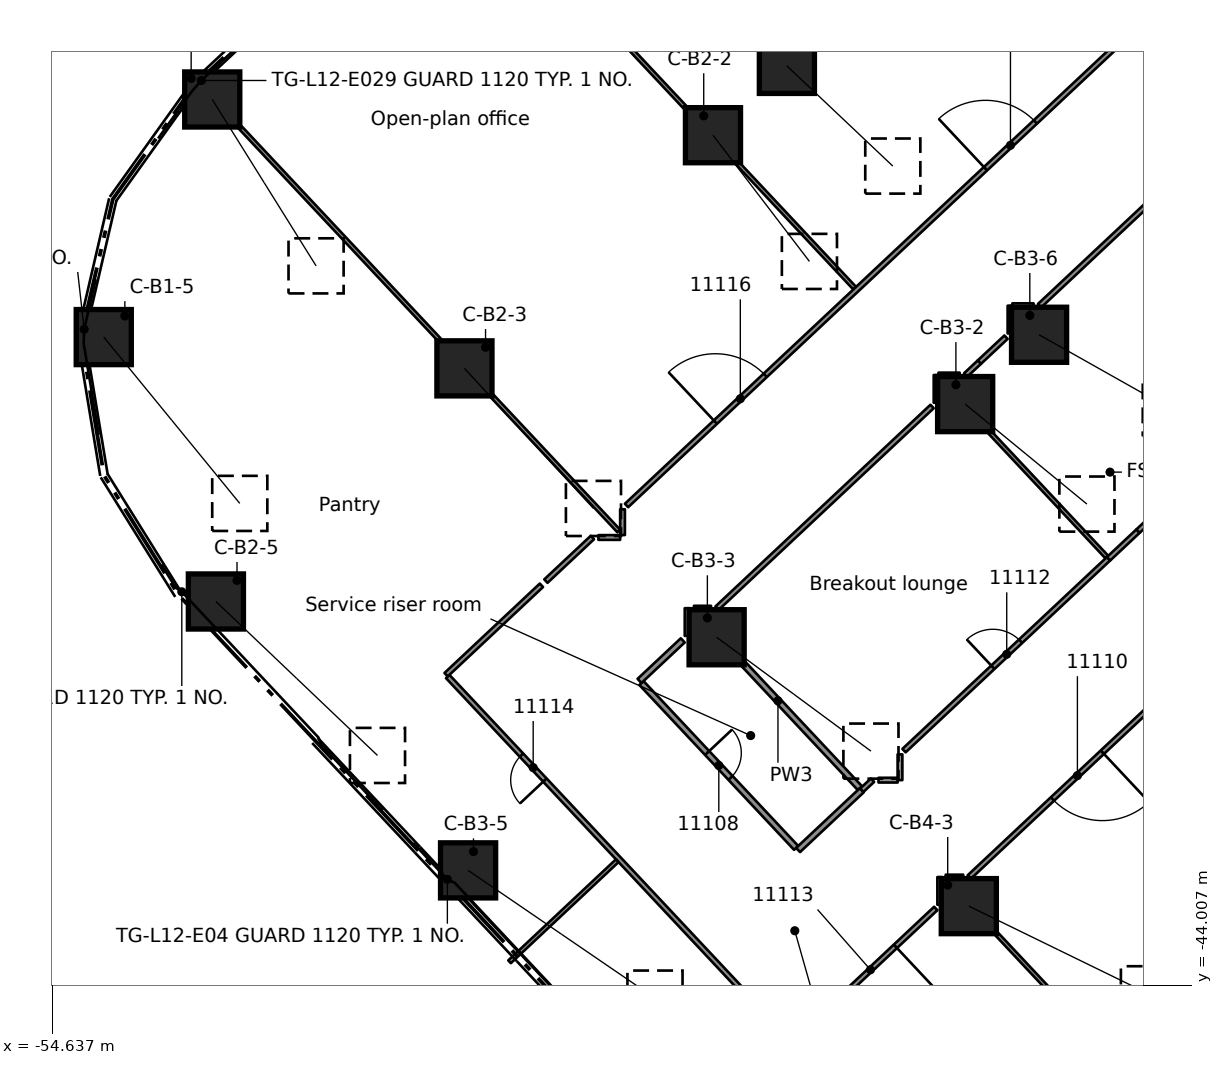
"""IFC4 building model, lengths in metres.
Left out: names, types, materials, properties, quantities, classifications, styles, units other than length and angle.
Written with IfcOpenShell. Run it as: python <this file> out.ifc"""

import sys

from ifc_helpers import new_model, si_unit, direction, frame, frame_2d, origin, origin_2d, place, context, subcontext, project, spatial, rectangle, extrude, element, fill, save


model = new_model("IFC4")
c1 = context("Model", 3, precision=1e-05, world=origin(), true_north=direction((0.0, 1.0)))
c2 = subcontext(c1, "Body", "Model", "MODEL_VIEW")
j1 = project(units=[si_unit("LENGTHUNIT", "METRE"), si_unit("PLANEANGLEUNIT", "RADIAN")], contexts=[c1])
p1 = place(None, origin())
s1 = spatial("IfcSite", under=j1, at=p1, CompositionType="ELEMENT")
p2 = place(p1, origin())
s2 = spatial("IfcBuilding", under=s1, at=p2, CompositionType="ELEMENT")
p3 = place(p2, frame((0.0, 0.0, 54.8)))
s3 = spatial("IfcBuildingStorey", under=s2, at=p3, CompositionType="ELEMENT", Elevation=54.8)
p4 = place(p3, frame((-50.421, -20.695, 0.641), z_axis=(0.468439802399, -0.750675829904, 0.465886198472), x_axis=(0.848370199322, 0.529403442473, 0.0)))
e1 = element("IfcColumn", 1, at=p4, inside=s3, PredefinedType="COLUMN", context=c2, shape_type="SweptSolid", body=[
    extrude(rectangle(XDim=1.45, YDim=1.45, at=origin_2d()), origin(), (0.0, 0.0, 1.0), 5.832),
])
p5 = place(p3, frame((-53.276, -26.947, 0.655), z_axis=(0.571623475147, -0.698941208032, 0.429799709603), x_axis=(0.774086203175, 0.633080208231, 0.0)))
e2 = element("IfcColumn", 2, at=p5, inside=s3, PredefinedType="COLUMN", context=c2, shape_type="SweptSolid", body=[
    extrude(rectangle(XDim=1.45, YDim=1.45, at=origin_2d()), origin(), (0.0, 0.0, 1.0), 6.261),
])
p6 = place(p3, frame((-37.245, -21.635, 0.603), z_axis=(0.504783779983, -0.660501515881, 0.55581569156), x_axis=(0.794535193581, 0.607218104276, 0.0)))
e3 = element("IfcColumn", 3, at=p6, inside=s3, PredefinedType="COLUMN", context=c2, shape_type="SweptSolid", body=[
    extrude(rectangle(XDim=1.45, YDim=1.45, at=origin_2d()), origin(), (0.0, 0.0, 1.0), 5.028),
])
p7 = place(p3, frame((-43.785, -27.77, 0.637), z_axis=(0.595118593192, -0.646131203798, 0.477858062102), x_axis=(0.735546382891, 0.677474367498, 0.0)))
e4 = element("IfcColumn", 4, at=p7, inside=s3, PredefinedType="COLUMN", context=c2, shape_type="SweptSolid", body=[
    extrude(rectangle(XDim=1.45, YDim=1.45, at=origin_2d()), origin(), (0.0, 0.0, 1.0), 5.705),
])
p8 = place(p3, frame((-50.325, -33.904, 0.659), z_axis=(0.658626651578, -0.627502987462, 0.415272121094), x_axis=(0.689793220223, 0.724006431833, 0.0)))
e5 = element("IfcColumn", 5, at=p8, inside=s3, PredefinedType="COLUMN", context=c2, shape_type="SweptSolid", body=[
    extrude(rectangle(XDim=1.45, YDim=1.45, at=origin_2d()), origin(), (0.0, 0.0, 1.0), 6.456),
])
p9 = place(p3, frame((-35.3, -19.811, 0.583), z_axis=(0.584399803244, -0.552712392749, 0.594126148953), x_axis=(0.687135400222, 0.726529381211, 0.0)))
e6 = element("IfcColumn", 6, at=p9, inside=s3, PredefinedType="COLUMN", context=c2, shape_type="SweptSolid", body=[
    extrude(rectangle(XDim=1.45, YDim=1.45, at=origin_2d()), origin(), (0.0, 0.0, 1.0), 4.769),
])
p10 = place(p3, frame((-30.609, -28.71, 0.601), z_axis=(0.640539472129, -0.526030167731, 0.559465322681), x_axis=(0.634647743871, 0.77280155357, 0.0)))
e7 = element("IfcColumn", 7, at=p10, inside=s3, PredefinedType="COLUMN", context=c2, shape_type="SweptSolid", body=[
    extrude(rectangle(XDim=1.45, YDim=1.45, at=origin_2d()), origin(), (0.0, 0.0, 1.0), 5.002),
])
p11 = place(p3, frame((-37.149, -34.845, 0.638), z_axis=(0.708122903714, -0.522429017336, 0.475005131636), x_axis=(0.593680789608, 0.804700640021, 0.0)))
e8 = element("IfcColumn", 8, at=p11, inside=s3, PredefinedType="COLUMN", context=c2, shape_type="SweptSolid", body=[
    extrude(rectangle(XDim=1.45, YDim=1.45, at=origin_2d()), origin(), (0.0, 0.0, 1.0), 5.735),
])
p12 = place(p3, frame((-43.689, -40.979, 0.661), z_axis=(0.753034303778, -0.514645713866, 0.409974543762), x_axis=(0.564244519655, 0.825607728912, 0.0)))
e9 = element("IfcColumn", 9, at=p12, inside=s3, PredefinedType="COLUMN", context=c2, shape_type="SweptSolid", body=[
    extrude(rectangle(XDim=1.45, YDim=1.45, at=origin_2d()), origin(), (0.0, 0.0, 1.0), 6.531),
])
p13 = place(p3, frame((-28.664, -26.886, 0.591), z_axis=(0.710018665714, -0.400138488717, 0.579450329351), x_axis=(0.490962919212, 0.871180470373, 0.0)))
e10 = element("IfcColumn", 10, at=p13, inside=s3, PredefinedType="COLUMN", context=c2, shape_type="SweptSolid", body=[
    extrude(rectangle(XDim=1.45, YDim=1.45, at=origin_2d()), origin(), (0.0, 0.0, 1.0), 4.864),
])
p14 = place(p3, frame((-30.513, -41.92, 0.644), z_axis=(0.798859330442, -0.389733768999, 0.458182670414), x_axis=(0.438465700067, 0.898747923427, 0.0)))
e11 = element("IfcColumn", 11, at=p14, inside=s3, PredefinedType="COLUMN", context=c2, shape_type="SweptSolid", body=[
    extrude(rectangle(XDim=1.45, YDim=1.45, at=origin_2d()), origin(), (0.0, 0.0, 1.0), 5.917),
])
p15 = place(p3, frame((-35.207, -45.49, 0.0), z_axis=(0.0, 0.0, 1.0), x_axis=(-0.684214039895, 0.72928125412, 0.0)))
e12 = element("IfcWall", 12, at=p15, inside=s3, PredefinedType="PARTITIONING", context=c2, shape_type="SweptSolid", body=[
    extrude(rectangle(XDim=13.18, YDim=0.125, at=frame_2d((6.59, 0.0))), origin(), (0.0, 0.0, 1.0), 3.58),
])
p16 = place(p15, frame((9.443, 0.0, 0.0)))
e13 = element("IfcOpeningElement", 13, at=p16, cuts=e12, PredefinedType="OPENING", context=c2, shape_type="SweptSolid", body=[
    extrude(rectangle(XDim=0.9, YDim=2.1, at=frame_2d((0.45, 1.05))), frame((0.0, 0.073, 0.0), z_axis=(0.0, -1.0, 0.0), x_axis=(1.0, 0.0, 0.0)), (0.0, 0.0, 1.0), 0.145),
])
p17 = place(p3, frame((-39.127, -36.049, 0.0), z_axis=(0.0, 0.0, 1.0), x_axis=(0.684241361078, -0.729255620335, 0.0)))
e14 = element("IfcWall", 14, at=p17, inside=s3, PredefinedType="PARTITIONING", context=c2, shape_type="SweptSolid", body=[
    extrude(rectangle(XDim=5.95, YDim=0.15, at=frame_2d((2.975, 0.0))), origin(), (0.0, 0.0, 1.0), 3.58),
])
p18 = place(p17, frame((2.525, 0.0, 0.0)))
e15 = element("IfcOpeningElement", 15, at=p18, cuts=e14, PredefinedType="OPENING", context=c2, shape_type="SweptSolid", body=[
    extrude(rectangle(XDim=0.9, YDim=2.1, at=frame_2d((0.45, 1.05))), frame((0.0, 0.085, 0.0), z_axis=(0.0, -1.0, 0.0), x_axis=(1.0, 0.0, 0.0)), (0.0, 0.0, 1.0), 0.17),
])
p19 = place(p3, frame((-50.979, -20.052, 0.0), z_axis=(0.0, 0.0, 1.0), x_axis=(0.684158310291, -0.729333535812, 0.0)))
e16 = element("IfcWall", 16, at=p19, inside=s3, PredefinedType="PARTITIONING", context=c2, shape_type="SweptSolid", body=[
    extrude(rectangle(XDim=16.451, YDim=0.1, at=frame_2d((8.225, 0.0))), origin(), (0.0, 0.0, 1.0), 3.58),
])
p20 = place(p3, frame((-37.691, -34.218, 0.0), z_axis=(0.0, 0.0, 1.0), x_axis=(0.684143396036, -0.729347525985, 0.0)))
e17 = element("IfcWall", 17, at=p20, inside=s3, PredefinedType="PARTITIONING", context=c2, shape_type="SweptSolid", body=[
    extrude(rectangle(XDim=6.303, YDim=0.15, at=frame_2d((3.151, 0.0))), origin(), (0.0, 0.0, 1.0), 3.58),
])
p21 = place(p3, frame((-31.085, -41.261, 0.0), z_axis=(0.0, 0.0, 1.0), x_axis=(0.684092269, -0.729395480857, 0.0)))
e18 = element("IfcWall", 18, at=p21, inside=s3, PredefinedType="PARTITIONING", context=c2, shape_type="SweptSolid", body=[
    extrude(rectangle(XDim=15.957, YDim=0.1, at=frame_2d((7.979, 0.0))), origin(), (0.0, 0.0, 1.0), 3.58),
])
p22 = place(p3, frame((-44.487, -13.964, 0.0), z_axis=(0.0, 0.0, 1.0), x_axis=(0.684144686813, -0.729346315207, 0.0)))
e19 = element("IfcWall", 19, at=p22, inside=s3, PredefinedType="PARTITIONING", context=c2, shape_type="SweptSolid", body=[
    extrude(rectangle(XDim=16.036, YDim=0.1, at=frame_2d((8.018, 0.0))), origin(), (0.0, 0.0, 1.0), 3.58),
])
p23 = place(p3, frame((-31.274, -28.052, 0.0), z_axis=(0.0, 0.0, 1.0), x_axis=(0.684140939344, -0.729349830406, 0.0)))
e20 = element("IfcWall", 20, at=p23, inside=s3, PredefinedType="PARTITIONING", context=c2, shape_type="SweptSolid", body=[
    extrude(rectangle(XDim=6.421, YDim=0.1, at=frame_2d((3.21, 0.0))), origin(), (0.0, 0.0, 1.0), 3.58),
])
p24 = place(p3, frame((-31.122, -41.155, 0.0), z_axis=(0.0, 0.0, 1.0), x_axis=(1.0, 0.0, 0.0)))
e21 = element("IfcWall", 21, at=p24, inside=s3, PredefinedType="PARTITIONING", context=c2, shape_type="SweptSolid", body=[
    extrude(rectangle(XDim=0.462, YDim=0.125, at=frame_2d((0.231, 0.0))), origin(), (0.0, 0.0, 1.0), 3.58),
])
p25 = place(p3, frame((-32.889, -38.605, 0.0), z_axis=(0.0, 0.0, 1.0), x_axis=(1.0, 0.0, 0.0)))
e22 = element("IfcWall", 22, at=p25, inside=s3, PredefinedType="PARTITIONING", context=c2, shape_type="SweptSolid", body=[
    extrude(rectangle(XDim=0.503, YDim=0.125, at=frame_2d((0.251, 0.0))), origin(), (0.0, 0.0, 1.0), 3.58),
])
p26 = place(p3, frame((-37.746, -34.08, 0.0), z_axis=(0.0, 0.0, 1.0), x_axis=(1.0, 0.0, 0.0)))
e23 = element("IfcWall", 23, at=p26, inside=s3, PredefinedType="PARTITIONING", context=c2, shape_type="SweptSolid", body=[
    extrude(rectangle(XDim=0.45, YDim=0.125, at=frame_2d((0.225, 0.0))), origin(), (0.0, 0.0, 1.0), 3.58),
])
p27 = place(p3, frame((-40.26, -32.22, 0.0), z_axis=(0.0, 0.0, 1.0), x_axis=(1.0, 0.0, 0.0)))
e24 = element("IfcWall", 24, at=p27, inside=s3, PredefinedType="PARTITIONING", context=c2, shape_type="SweptSolid", body=[
    extrude(rectangle(XDim=0.572, YDim=0.125, at=frame_2d((0.286, 0.0))), origin(), (0.0, 0.0, 1.0), 3.58),
])
p28 = place(p3, frame((-31.311, -27.945, 0.0), z_axis=(0.0, 0.0, 1.0), x_axis=(1.0, 0.0, 0.0)))
e25 = element("IfcWall", 25, at=p28, inside=s3, PredefinedType="PARTITIONING", context=c2, shape_type="SweptSolid", body=[
    extrude(rectangle(XDim=0.557, YDim=0.125, at=frame_2d((0.279, 0.0))), origin(), (0.0, 0.0, 1.0), 3.58),
])
p29 = place(p3, frame((-29.366, -26.121, 0.0), z_axis=(0.0, 0.0, 1.0), x_axis=(1.0, 0.0, 0.0)))
e26 = element("IfcWall", 26, at=p29, inside=s3, PredefinedType="PARTITIONING", context=c2, shape_type="SweptSolid", body=[
    extrude(rectangle(XDim=0.557, YDim=0.125, at=frame_2d((0.278, 0.0))), origin(), (0.0, 0.0, 1.0), 3.58),
])
p30 = place(p3, frame((-30.236, -27.607, 0.0), z_axis=(0.0, 0.0, 1.0), x_axis=(0.730201947911, 0.683231377548, 0.0)))
e27 = element("IfcWall", 27, at=p30, inside=s3, PredefinedType="PARTITIONING", context=c2, shape_type="SweptSolid", body=[
    extrude(rectangle(XDim=0.962, YDim=0.125, at=frame_2d((0.481, 0.0))), origin(), (0.0, 0.0, 1.0), 3.58),
])
p31 = place(p3, frame((-44.268, -35.831, 0.0), z_axis=(0.0, 0.0, 1.0), x_axis=(0.729419883879, 0.684066248986, 0.0)))
e28 = element("IfcWall", 28, at=p31, inside=s3, PredefinedType="PARTITIONING", context=c2, shape_type="SweptSolid", body=[
    extrude(rectangle(XDim=3.44, YDim=0.125, at=frame_2d((1.72, 0.0))), origin(), (0.0, 0.0, 1.0), 3.58),
])
p32 = place(p3, frame((-41.642, -33.368, 0.0), z_axis=(0.0, 0.0, 1.0), x_axis=(0.729727797371, 0.683737772647, 0.0)))
e29 = element("IfcWall", 29, at=p32, inside=s3, PredefinedType="PARTITIONING", context=c2, shape_type="SweptSolid", body=[
    extrude(rectangle(XDim=1.677, YDim=0.125, at=frame_2d((0.839, 0.0))), origin(), (0.0, 0.0, 1.0), 3.58),
])
p33 = place(p3, frame((-31.383, -41.982, 0.0), z_axis=(0.0, 0.0, 1.0), x_axis=(-0.729340966423, -0.684150388947, 0.0)))
e30 = element("IfcWall", 30, at=p33, inside=s3, PredefinedType="PARTITIONING", context=c2, shape_type="SweptSolid", body=[
    extrude(rectangle(XDim=4.889, YDim=0.125, at=frame_2d((2.445, 0.0))), origin(), (0.0, 0.0, 1.0), 3.58),
])
p34 = place(p33, frame((1.456, 0.0, 0.0)))
e31 = element("IfcOpeningElement", 31, at=p34, cuts=e30, PredefinedType="OPENING", context=c2, shape_type="SweptSolid", body=[
    extrude(rectangle(XDim=1.8, YDim=2.1, at=frame_2d((0.9, 1.05))), frame((0.0, 0.073, 0.0), z_axis=(0.0, -1.0, 0.0), x_axis=(1.0, 0.0, 0.0)), (0.0, 0.0, 1.0), 0.145),
])
p35 = place(p3, frame((-24.843, -35.848, 0.0), z_axis=(0.0, 0.0, 1.0), x_axis=(-0.729416485857, -0.684069872279, 0.0)))
e32 = element("IfcWall", 32, at=p35, inside=s3, PredefinedType="PARTITIONING", context=c2, shape_type="SweptSolid", body=[
    extrude(rectangle(XDim=7.758, YDim=0.125, at=frame_2d((3.879, 0.0))), origin(), (0.0, 0.0, 1.0), 3.58),
])
p36 = place(p35, frame((2.956, 0.0, 0.0)))
e33 = element("IfcOpeningElement", 33, at=p36, cuts=e32, PredefinedType="OPENING", context=c2, shape_type="SweptSolid", body=[
    extrude(rectangle(XDim=1.8, YDim=2.1, at=frame_2d((0.9, 1.05))), frame((0.0, 0.073, 0.0), z_axis=(0.0, -1.0, 0.0), x_axis=(1.0, 0.0, 0.0)), (0.0, 0.0, 1.0), 0.145),
])
p37 = place(p3, frame((-35.005, -40.443, 0.0), z_axis=(0.0, 0.0, 1.0), x_axis=(0.729361682403, 0.684128303934, 0.0)))
e34 = element("IfcWall", 34, at=p37, inside=s3, PredefinedType="PARTITIONING", context=c2, shape_type="SweptSolid", body=[
    extrude(rectangle(XDim=2.299, YDim=0.15, at=frame_2d((1.15, 0.0))), origin(), (0.0, 0.0, 1.0), 3.58),
])
p38 = place(p3, frame((-32.218, -37.828, 0.0), z_axis=(0.0, 0.0, 1.0), x_axis=(0.729395805056, 0.68409192333, 0.0)))
e35 = element("IfcWall", 35, at=p38, inside=s3, PredefinedType="PARTITIONING", context=c2, shape_type="SweptSolid", body=[
    extrude(rectangle(XDim=7.377, YDim=0.125, at=frame_2d((3.689, 0.0))), origin(), (0.0, 0.0, 1.0), 3.58),
])
p39 = place(p38, frame((3.206, 0.0, 0.0)))
e36 = element("IfcOpeningElement", 36, at=p39, cuts=e35, PredefinedType="OPENING", context=c2, shape_type="SweptSolid", body=[
    extrude(rectangle(XDim=1.0, YDim=2.1, at=frame_2d((0.5, 1.05))), frame((0.0, 0.073, 0.0), z_axis=(0.0, -1.0, 0.0), x_axis=(1.0, 0.0, 0.0)), (0.0, 0.0, 1.0), 0.145),
])
p40 = place(p3, frame((-26.063, -32.055, 0.0), z_axis=(0.0, 0.0, 1.0), x_axis=(0.729480399327, 0.684001715639, 0.0)))
e37 = element("IfcWall", 37, at=p40, inside=s3, PredefinedType="PARTITIONING", context=c2, shape_type="SweptSolid", body=[
    extrude(rectangle(XDim=8.444, YDim=0.125, at=frame_2d((4.222, 0.0))), origin(), (0.0, 0.0, 1.0), 3.58),
])
p41 = place(p40, frame((3.85, 0.0, 0.0)))
e38 = element("IfcOpeningElement", 38, at=p41, cuts=e37, PredefinedType="OPENING", context=c2, shape_type="SweptSolid", body=[
    extrude(rectangle(XDim=1.1, YDim=2.1, at=frame_2d((0.55, 1.05))), frame((0.0, 0.073, 0.0), z_axis=(0.0, -1.0, 0.0), x_axis=(1.0, 0.0, 0.0)), (0.0, 0.0, 1.0), 0.145),
])
p42 = place(p3, frame((-26.836, -32.781, 0.0), z_axis=(0.0, 0.0, 1.0), x_axis=(0.728861997168, 0.684660637896, 0.0)))
e39 = element("IfcWall", 39, at=p42, inside=s3, PredefinedType="PARTITIONING", context=c2, shape_type="SweptSolid", body=[
    extrude(rectangle(XDim=1.061, YDim=0.125, at=frame_2d((0.53, 0.0))), origin(), (0.0, 0.0, 1.0), 3.58),
])
p43 = place(p3, frame((-33.328, -38.87, 0.0), z_axis=(0.0, 0.0, 1.0), x_axis=(0.728311539341, 0.685246161363, 0.0)))
e40 = element("IfcWall", 40, at=p43, inside=s3, PredefinedType="PARTITIONING", context=c2, shape_type="SweptSolid", body=[
    extrude(rectangle(XDim=0.385, YDim=0.125, at=frame_2d((0.193, 0.0))), origin(), (0.0, 0.0, 1.0), 3.58),
])
p44 = place(p3, frame((-42.598, -43.384, 0.0), z_axis=(0.0, 0.0, 1.0), x_axis=(0.729270698329, 0.684225290791, 0.0)))
e41 = element("IfcWall", 41, at=p44, inside=s3, PredefinedType="PARTITIONING", context=c2, shape_type="SweptSolid", body=[
    extrude(rectangle(XDim=3.886, YDim=0.1, at=frame_2d((1.943, 0.0))), origin(), (0.0, 0.0, 1.0), 3.58),
])
p45 = place(p3, frame((-39.178, -35.994, 0.0), z_axis=(0.0, 0.0, 1.0), x_axis=(0.729512799171, 0.683967159918, 0.0)))
e42 = element("IfcWall", 42, at=p45, inside=s3, PredefinedType="PARTITIONING", context=c2, shape_type="SweptSolid", body=[
    extrude(rectangle(XDim=1.56, YDim=0.15, at=frame_2d((0.78, 0.0))), origin(), (0.0, 0.0, 1.0), 3.58),
])
p46 = place(p3, frame((-37.138, -34.08, 0.0), z_axis=(0.0, 0.0, 1.0), x_axis=(0.729416485857, 0.684069872279, 0.0)))
e43 = element("IfcWall", 43, at=p46, inside=s3, PredefinedType="PARTITIONING", context=c2, shape_type="SweptSolid", body=[
    extrude(rectangle(XDim=7.758, YDim=0.125, at=frame_2d((3.879, 0.0))), origin(), (0.0, 0.0, 1.0), 3.58),
])
p47 = place(p3, frame((-28.651, -26.121, 0.0), z_axis=(0.0, 0.0, 1.0), x_axis=(0.729302874573, 0.684190994635, 0.0)))
e44 = element("IfcWall", 44, at=p47, inside=s3, PredefinedType="PARTITIONING", context=c2, shape_type="SweptSolid", body=[
    extrude(rectangle(XDim=6.954, YDim=0.125, at=frame_2d((3.477, 0.0))), origin(), (0.0, 0.0, 1.0), 3.58),
])
p48 = place(p3, frame((-30.596, -27.945, 0.0), z_axis=(0.0, 0.0, 1.0), x_axis=(0.728765825334, 0.68476300413, 0.0)))
e45 = element("IfcWall", 45, at=p48, inside=s3, PredefinedType="PARTITIONING", context=c2, shape_type="SweptSolid", body=[
    extrude(rectangle(XDim=0.494, YDim=0.125, at=frame_2d((0.247, 0.0))), origin(), (0.0, 0.0, 1.0), 3.58),
])
p49 = place(p3, frame((-39.52, -31.378, 0.0), z_axis=(0.0, 0.0, 1.0), x_axis=(0.729357865, 0.684132373713, 0.0)))
e46 = element("IfcWall", 46, at=p49, inside=s3, PredefinedType="PARTITIONING", context=c2, shape_type="SweptSolid", body=[
    extrude(rectangle(XDim=18.597, YDim=0.125, at=frame_2d((9.299, 0.0))), origin(), (0.0, 0.0, 1.0), 3.58),
])
p50 = place(p49, frame((12.952, 0.0, 0.0)))
e47 = element("IfcOpeningElement", 47, at=p50, cuts=e46, PredefinedType="OPENING", context=c2, shape_type="SweptSolid", body=[
    extrude(rectangle(XDim=1.8, YDim=2.1, at=frame_2d((0.9, 1.05))), frame((0.0, 0.073, 0.0), z_axis=(0.0, -1.0, 0.0), x_axis=(1.0, 0.0, 0.0)), (0.0, 0.0, 1.0), 0.145),
])
p51 = place(p49, frame((3.206, 0.0, 0.0)))
e48 = element("IfcOpeningElement", 48, at=p51, cuts=e46, PredefinedType="OPENING", context=c2, shape_type="SweptSolid", body=[
    extrude(rectangle(XDim=1.8, YDim=2.1, at=frame_2d((0.9, 1.05))), frame((0.0, 0.073, 0.0), z_axis=(0.0, -1.0, 0.0), x_axis=(1.0, 0.0, 0.0)), (0.0, 0.0, 1.0), 0.145),
])
p52 = place(p3, frame((-29.429, -26.851, 0.0), z_axis=(0.0, 0.0, 1.0), x_axis=(0.0, 1.0, 0.0)))
e49 = element("IfcWall", 49, at=p52, inside=s3, PredefinedType="PARTITIONING", context=c2, shape_type="SweptSolid", body=[
    extrude(rectangle(XDim=0.73, YDim=0.125, at=frame_2d((0.365, 0.0))), origin(), (0.0, 0.0, 1.0), 3.58),
])
p53 = place(p3, frame((-31.278, -41.883, 0.0), z_axis=(0.0, 0.0, 1.0), x_axis=(0.0, 1.0, 0.0)))
e50 = element("IfcWall", 50, at=p53, inside=s3, PredefinedType="PARTITIONING", context=c2, shape_type="SweptSolid", body=[
    extrude(rectangle(XDim=0.728, YDim=0.125, at=frame_2d((0.364, 0.0))), origin(), (0.0, 0.0, 1.0), 3.58),
])
p54 = place(p3, frame((-31.374, -28.674, 0.0), z_axis=(0.0, 0.0, 1.0), x_axis=(0.0, 1.0, 0.0)))
e51 = element("IfcWall", 51, at=p54, inside=s3, PredefinedType="PARTITIONING", context=c2, shape_type="SweptSolid", body=[
    extrude(rectangle(XDim=0.729, YDim=0.125, at=frame_2d((0.365, 0.0))), origin(), (0.0, 0.0, 1.0), 3.58),
])
p55 = place(p3, frame((-32.324, -38.605, 0.0), z_axis=(0.0, 0.0, 1.0), x_axis=(0.0, 1.0, 0.0)))
e52 = element("IfcWall", 52, at=p55, inside=s3, PredefinedType="PARTITIONING", context=c2, shape_type="SweptSolid", body=[
    extrude(rectangle(XDim=0.678, YDim=0.125, at=frame_2d((0.339, 0.0))), origin(), (0.0, 0.0, 1.0), 3.58),
])
p56 = place(p3, frame((-37.913, -34.808, 0.0), z_axis=(0.0, 0.0, 1.0), x_axis=(0.0, 1.0, 0.0)))
e53 = element("IfcWall", 53, at=p56, inside=s3, PredefinedType="PARTITIONING", context=c2, shape_type="SweptSolid", body=[
    extrude(rectangle(XDim=0.728, YDim=0.15, at=frame_2d((0.364, 0.0))), origin(), (0.0, 0.0, 1.0), 3.58),
])
p57 = place(p3, frame((-39.625, -32.156, 0.0), z_axis=(0.0, 0.0, 1.0), x_axis=(0.0, 1.0, 0.0)))
e54 = element("IfcWall", 54, at=p57, inside=s3, PredefinedType="PARTITIONING", context=c2, shape_type="SweptSolid", body=[
    extrude(rectangle(XDim=0.679, YDim=0.125, at=frame_2d((0.339, 0.0))), origin(), (0.0, 0.0, 1.0), 3.58),
])
p58 = place(p18, origin())
e55 = element("IfcDoor", 55, at=p58, inside=s3, OperationType="SINGLE_SWING_RIGHT", PredefinedType="DOOR", context=c2, shape_type="SweptSolid", body=[
    extrude(rectangle(XDim=0.9, YDim=2.1, at=frame_2d((0.45, 1.05))), frame((0.0, 0.025, 0.0), z_axis=(0.0, -1.0, 0.0), x_axis=(1.0, 0.0, 0.0)), (0.0, 0.0, 1.0), 0.05),
])
fill(e15, e55)
p59 = place(p36, origin())
e56 = element("IfcDoor", 56, at=p59, inside=s3, OperationType="DOUBLE_DOOR_SINGLE_SWING", PredefinedType="DOOR", context=c2, shape_type="SweptSolid", body=[
    extrude(rectangle(XDim=1.8, YDim=2.1, at=frame_2d((0.9, 1.05))), frame((0.0, 0.025, 0.0), z_axis=(0.0, -1.0, 0.0), x_axis=(1.0, 0.0, 0.0)), (0.0, 0.0, 1.0), 0.05),
])
fill(e33, e56)
p60 = place(p39, origin())
e57 = element("IfcDoor", 57, at=p60, inside=s3, OperationType="SINGLE_SWING_RIGHT", PredefinedType="DOOR", context=c2, shape_type="SweptSolid", body=[
    extrude(rectangle(XDim=1.0, YDim=2.1, at=frame_2d((0.5, 1.05))), frame((0.0, 0.025, 0.0), z_axis=(0.0, -1.0, 0.0), x_axis=(1.0, 0.0, 0.0)), (0.0, 0.0, 1.0), 0.05),
])
fill(e36, e57)
p61 = place(p34, origin())
e58 = element("IfcDoor", 58, at=p61, inside=s3, OperationType="DOUBLE_DOOR_SINGLE_SWING", PredefinedType="DOOR", context=c2, shape_type="SweptSolid", body=[
    extrude(rectangle(XDim=1.8, YDim=2.1, at=frame_2d((0.9, 1.05))), frame((0.0, 0.025, 0.0), z_axis=(0.0, -1.0, 0.0), x_axis=(1.0, 0.0, 0.0)), (0.0, 0.0, 1.0), 0.05),
])
fill(e31, e58)
p62 = place(p16, origin())
e59 = element("IfcDoor", 59, at=p62, inside=s3, OperationType="SINGLE_SWING_RIGHT", PredefinedType="DOOR", context=c2, shape_type="SweptSolid", body=[
    extrude(rectangle(XDim=0.9, YDim=2.1, at=frame_2d((0.45, 1.05))), frame((0.0, 0.025, 0.0), z_axis=(0.0, -1.0, 0.0), x_axis=(1.0, 0.0, 0.0)), (0.0, 0.0, 1.0), 0.05),
])
fill(e13, e59)
p63 = place(p50, origin())
e60 = element("IfcDoor", 60, at=p63, inside=s3, OperationType="DOUBLE_DOOR_SINGLE_SWING", PredefinedType="DOOR", context=c2, shape_type="SweptSolid", body=[
    extrude(rectangle(XDim=1.8, YDim=2.1, at=frame_2d((0.9, 1.05))), frame((0.0, 0.025, 0.0), z_axis=(0.0, -1.0, 0.0), x_axis=(1.0, 0.0, 0.0)), (0.0, 0.0, 1.0), 0.05),
])
fill(e47, e60)
p64 = place(p51, origin())
e61 = element("IfcDoor", 61, at=p64, inside=s3, OperationType="DOUBLE_DOOR_SINGLE_SWING", PredefinedType="DOOR", context=c2, shape_type="SweptSolid", body=[
    extrude(rectangle(XDim=1.8, YDim=2.1, at=frame_2d((0.9, 1.05))), frame((0.0, 0.025, 0.0), z_axis=(0.0, -1.0, 0.0), x_axis=(1.0, 0.0, 0.0)), (0.0, 0.0, 1.0), 0.05),
])
fill(e48, e61)
save(model, sys.argv[1])
